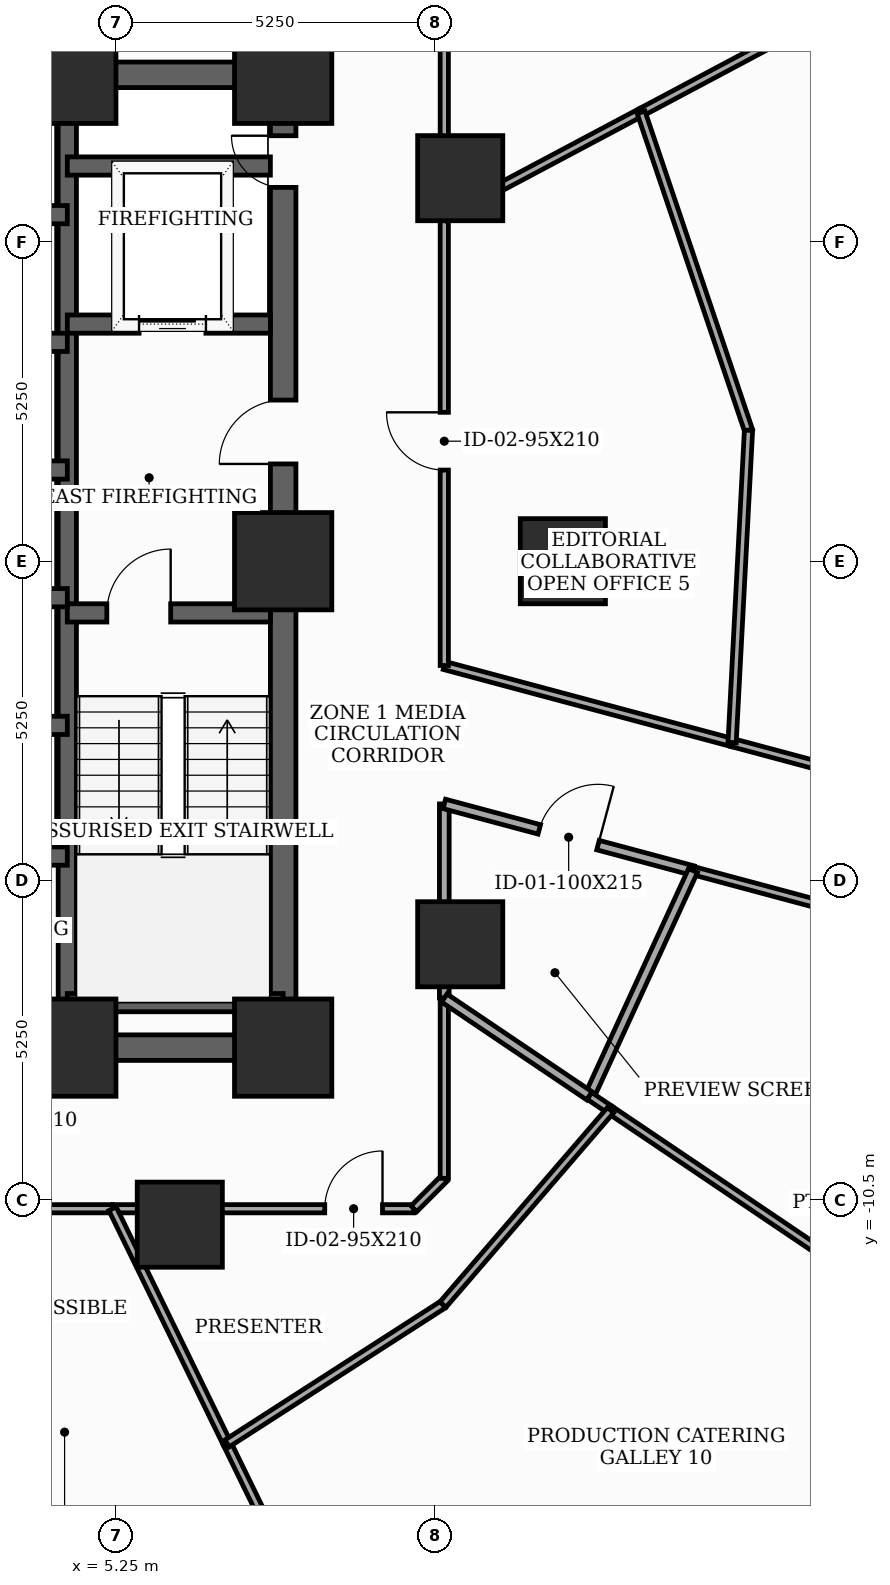
"""IFC4 building model, lengths in metres.
Left out: names, types, materials, properties, quantities, classifications, styles, units other than length and angle.
Written with IfcOpenShell. Run it as: python <this file> out.ifc"""

import sys

from ifc_helpers import new_model, si_unit, direction, frame, frame_2d, origin, origin_2d, place, context, subcontext, project, spatial, rectangle, extrude, element, fill, save


model = new_model("IFC4")
c1 = context("Model", 3, precision=1e-05, world=origin(), true_north=direction((0.0, 1.0)))
c2 = subcontext(c1, "Body", "Model", "MODEL_VIEW")
j1 = project(units=[si_unit("LENGTHUNIT", "METRE"), si_unit("PLANEANGLEUNIT", "RADIAN")], contexts=[c1])
p1 = place(None, origin())
s1 = spatial("IfcSite", under=j1, at=p1, CompositionType="ELEMENT")
p2 = place(p1, origin())
s2 = spatial("IfcBuilding", under=s1, at=p2, CompositionType="ELEMENT")
p3 = place(p2, frame((0.0, 0.0, 44.5)))
s3 = spatial("IfcBuildingStorey", under=s2, at=p3, CompositionType="ELEMENT", Elevation=44.5)
for number, where, z_axis, x_axis in (
    (1, (4.45, -8.0, 0.0), (0.0, 0.0, 1.0), (1.0, 0.0, 0.0)),
    (2, (8.0, -8.0, 0.0), (0.0, 0.0, 1.0), (1.0, 0.0, 0.0)),
    (3, (8.0, 0.0, 0.0), (0.0, 0.0, 1.0), (1.0, 0.0, 0.0)),
    (4, (8.0, 8.0, 0.0), (0.0, 0.0, 1.0), (1.0, 0.0, 0.0)),
    (5, (4.45, 8.0, 0.0), (0.0, 0.0, 1.0), (1.0, 0.0, 0.0)),
):
    element("IfcColumn", number, at=place(p3, frame(where, z_axis=z_axis, x_axis=x_axis)), inside=s3, PredefinedType="COLUMN", context=c2, shape_type="SweptSolid", body=[
        extrude(rectangle(XDim=1.6, YDim=1.6, at=origin_2d()), origin(), (0.0, 0.0, 1.0), 3.7),
    ])
for number, where, z_axis, x_axis in (
    (6, (12.6, 0.0, 0.0), (0.0, 0.0, 1.0), (1.0, 0.0, 0.0)),
    (7, (10.912, 6.3, 0.0), (0.0, 0.0, 1.0), (1.0, 0.0, 0.0)),
    (8, (6.3, -10.912, 0.0), (0.0, 0.0, 1.0), (1.0, 0.0, 0.0)),
    (9, (10.912, -6.3, 0.0), (0.0, 0.0, 1.0), (1.0, 0.0, 0.0)),
):
    element("IfcColumn", number, at=place(p3, frame(where, z_axis=z_axis, x_axis=x_axis)), inside=s3, PredefinedType="COLUMN", context=c2, shape_type="SweptSolid", body=[
        extrude(rectangle(XDim=1.4, YDim=1.4, at=origin_2d()), origin(), (0.0, 0.0, 1.0), 3.7),
    ])
p4 = place(p3, frame((8.0, -8.0, 0.0), z_axis=(0.0, 0.0, 1.0), x_axis=(0.0, 1.0, 0.0)))
e10 = element("IfcWall", 10, at=p4, inside=s3, PredefinedType="SHEAR", context=c2, shape_type="SweptSolid", body=[
    extrude(rectangle(XDim=16.0, YDim=0.42, at=frame_2d((8.0, 0.0))), origin(), (0.0, 0.0, 1.0), 3.5),
])
p5 = place(p4, frame((9.6, 0.0, 0.0)))
e11 = element("IfcOpeningElement", 11, at=p5, cuts=e10, PredefinedType="OPENING", context=c2, shape_type="SweptSolid", body=[
    extrude(rectangle(XDim=1.05, YDim=2.15, at=frame_2d((0.525, 1.075))), frame((0.0, 0.22, 0.0), z_axis=(0.0, -1.0, 0.0), x_axis=(1.0, 0.0, 0.0)), (0.0, 0.0, 1.0), 0.44),
])
p6 = place(p4, frame((14.148, 0.0, 0.0)))
e12 = element("IfcOpeningElement", 12, at=p6, cuts=e10, PredefinedType="OPENING", context=c2, shape_type="SweptSolid", body=[
    extrude(rectangle(XDim=0.85, YDim=2.02, at=frame_2d((0.425, 1.01))), frame((0.0, 0.22, 0.0), z_axis=(0.0, -1.0, 0.0), x_axis=(1.0, 0.0, 0.0)), (0.0, 0.0, 1.0), 0.44),
])
p7 = place(p3, frame((-8.0, -8.0, 0.0), z_axis=(0.0, 0.0, 1.0), x_axis=(1.0, 0.0, 0.0)))
e13 = element("IfcWall", 13, at=p7, inside=s3, PredefinedType="SHEAR", context=c2, shape_type="SweptSolid", body=[
    extrude(rectangle(XDim=16.0, YDim=0.42, at=frame_2d((8.0, 0.0))), origin(), (0.0, 0.0, 1.0), 3.5),
])
p8 = place(p7, frame((4.6, 0.0, 0.0)))
e14 = element("IfcOpeningElement", 14, at=p8, cuts=e13, PredefinedType="OPENING", context=c2, shape_type="SweptSolid", body=[
    extrude(rectangle(XDim=0.95, YDim=2.1, at=frame_2d((0.475, 1.05))), frame((0.0, 0.22, 0.0), z_axis=(0.0, -1.0, 0.0), x_axis=(1.0, 0.0, 0.0)), (0.0, 0.0, 1.0), 0.44),
])
p9 = place(p7, frame((7.52, 0.0, 0.0)))
e15 = element("IfcOpeningElement", 15, at=p9, cuts=e13, PredefinedType="OPENING", context=c2, shape_type="SweptSolid", body=[
    extrude(rectangle(XDim=0.95, YDim=2.1, at=frame_2d((0.475, 1.05))), frame((0.0, 0.22, 0.0), z_axis=(0.0, -1.0, 0.0), x_axis=(1.0, 0.0, 0.0)), (0.0, 0.0, 1.0), 0.44),
])
p10 = place(p7, frame((10.45, 0.0, 0.0)))
e16 = element("IfcOpeningElement", 16, at=p10, cuts=e13, PredefinedType="OPENING", context=c2, shape_type="SweptSolid", body=[
    extrude(rectangle(XDim=0.95, YDim=2.1, at=frame_2d((0.475, 1.05))), frame((0.0, 0.22, 0.0), z_axis=(0.0, -1.0, 0.0), x_axis=(1.0, 0.0, 0.0)), (0.0, 0.0, 1.0), 0.44),
])
p11 = place(p3, frame((-8.0, 8.0, 0.0), z_axis=(0.0, 0.0, 1.0), x_axis=(1.0, 0.0, 0.0)))
e17 = element("IfcWall", 17, at=p11, inside=s3, PredefinedType="SHEAR", context=c2, shape_type="SweptSolid", body=[
    extrude(rectangle(XDim=16.0, YDim=0.42, at=frame_2d((8.0, 0.0))), origin(), (0.0, 0.0, 1.0), 3.5),
])
p12 = place(p11, frame((7.1, 0.0, 0.0)))
e18 = element("IfcOpeningElement", 18, at=p12, cuts=e17, PredefinedType="OPENING", context=c2, shape_type="SweptSolid", body=[
    extrude(rectangle(XDim=1.8, YDim=2.15, at=frame_2d((0.9, 1.075))), frame((0.0, 0.22, 0.0), z_axis=(0.0, -1.0, 0.0), x_axis=(1.0, 0.0, 0.0)), (0.0, 0.0, 1.0), 0.44),
])
p13 = place(p3, frame((4.45, -7.79, 0.0), z_axis=(0.0, 0.0, 1.0), x_axis=(0.0, 1.0, 0.0)))
e19 = element("IfcWall", 19, at=p13, inside=s3, PredefinedType="SHEAR", context=c2, shape_type="SweptSolid", body=[
    extrude(rectangle(XDim=15.58, YDim=0.3, at=frame_2d((7.79, 0.0))), origin(), (0.0, 0.0, 1.0), 3.5),
])
p14 = place(p3, frame((4.45, -0.85, 0.0), z_axis=(0.0, 0.0, 1.0), x_axis=(1.0, 0.0, 0.0)))
e20 = element("IfcWall", 20, at=p14, inside=s3, PredefinedType="SHEAR", context=c2, shape_type="SweptSolid", body=[
    extrude(rectangle(XDim=3.34, YDim=0.3, at=frame_2d((1.67, 0.0))), origin(), (0.0, 0.0, 1.0), 3.5),
])
p15 = place(p14, frame((0.65, 0.0, 0.0)))
e21 = element("IfcOpeningElement", 21, at=p15, cuts=e20, PredefinedType="OPENING", context=c2, shape_type="SweptSolid", body=[
    extrude(rectangle(XDim=1.05, YDim=2.15, at=frame_2d((0.525, 1.075))), frame((0.0, 0.16, 0.0), z_axis=(0.0, -1.0, 0.0), x_axis=(1.0, 0.0, 0.0)), (0.0, 0.0, 1.0), 0.32),
])
p16 = place(p3, frame((4.45, -7.26, 0.0), z_axis=(0.0, 0.0, 1.0), x_axis=(1.0, 0.0, 0.0)))
e22 = element("IfcWall", 22, at=p16, inside=s3, PredefinedType="SHEAR", context=c2, shape_type="SweptSolid", body=[
    extrude(rectangle(XDim=3.55, YDim=0.3, at=frame_2d((1.775, 0.0))), origin(), (0.0, 0.0, 1.0), 3.5),
])
p17 = place(p3, frame((4.45, 3.9, 0.0), z_axis=(0.0, 0.0, 1.0), x_axis=(1.0, 0.0, 0.0)))
e23 = element("IfcWall", 23, at=p17, inside=s3, PredefinedType="SHEAR", context=c2, shape_type="SweptSolid", body=[
    extrude(rectangle(XDim=3.34, YDim=0.3, at=frame_2d((1.67, 0.0))), origin(), (0.0, 0.0, 1.0), 3.5),
])
p18 = place(p17, frame((1.18, 0.0, 0.0)))
e24 = element("IfcOpeningElement", 24, at=p18, cuts=e23, PredefinedType="OPENING", context=c2, shape_type="SweptSolid", body=[
    extrude(rectangle(XDim=1.1, YDim=2.1, at=frame_2d((0.55, 1.05))), frame((0.0, 0.16, 0.0), z_axis=(0.0, -1.0, 0.0), x_axis=(1.0, 0.0, 0.0)), (0.0, 0.0, 1.0), 0.32),
])
p19 = place(p3, frame((4.45, 6.5, 0.0), z_axis=(0.0, 0.0, 1.0), x_axis=(1.0, 0.0, 0.0)))
e25 = element("IfcWall", 25, at=p19, inside=s3, PredefinedType="SHEAR", context=c2, shape_type="SweptSolid", body=[
    extrude(rectangle(XDim=3.34, YDim=0.3, at=frame_2d((1.67, 0.0))), origin(), (0.0, 0.0, 1.0), 3.5),
])
p20 = place(p3, frame((-4.45, -4.85, 0.0), z_axis=(0.0, 0.0, 1.0), x_axis=(1.0, 0.0, 0.0)))
e26 = element("IfcWall", 26, at=p20, inside=s3, PredefinedType="SHEAR", context=c2, shape_type="SweptSolid", body=[
    extrude(rectangle(XDim=8.9, YDim=0.3, at=frame_2d((4.45, 0.0))), origin(), (0.0, 0.0, 1.0), 3.5),
])
for number, where, z_axis, x_axis in (
    (27, (1.68, 1.5, 0.0), (0.0, 0.0, 1.0), (1.0, 0.0, 0.0)),
    (28, (1.68, 3.6, 0.0), (0.0, 0.0, 1.0), (1.0, 0.0, 0.0)),
    (29, (1.68, 5.7, 0.0), (0.0, 0.0, 1.0), (1.0, 0.0, 0.0)),
    (30, (1.68, -2.7, 0.0), (0.0, 0.0, 1.0), (1.0, 0.0, 0.0)),
    (31, (1.68, -0.6, 0.0), (0.0, 0.0, 1.0), (1.0, 0.0, 0.0)),
):
    element("IfcWall", number, at=place(p3, frame(where, z_axis=z_axis, x_axis=x_axis)), inside=s3, PredefinedType="SHEAR", context=c2, shape_type="SweptSolid", body=[
        extrude(rectangle(XDim=2.77, YDim=0.3, at=frame_2d((1.385, 0.0))), origin(), (0.0, 0.0, 1.0), 3.5),
    ])
p21 = place(p3, frame((10.65, 5.663, 0.0), z_axis=(0.0, 0.0, 1.0), x_axis=(0.0, 1.0, 0.0)))
e32 = element("IfcWall", 32, at=p21, inside=s3, PredefinedType="PARTITIONING", context=c2, shape_type="SweptSolid", body=[
    extrude(rectangle(XDim=4.487, YDim=0.135, at=frame_2d((2.243, 0.0))), origin(), (0.0, 0.0, 1.0), 2.785),
])
p22 = place(p3, frame((10.65, -7.184, 0.0), z_axis=(0.0, 0.0, 1.0), x_axis=(0.0, 1.0, 0.0)))
e33 = element("IfcWall", 33, at=p22, inside=s3, PredefinedType="PARTITIONING", context=c2, shape_type="SweptSolid", body=[
    extrude(rectangle(XDim=3.192, YDim=0.16, at=frame_2d((1.596, 0.0))), origin(), (0.0, 0.0, 1.0), 2.785),
])
p23 = place(p3, frame((10.65, -3.992, 0.0), z_axis=(0.0, 0.0, 1.0), x_axis=(0.965925146235, -0.258821583086, 0.0)))
e34 = element("IfcWall", 34, at=p23, inside=s3, PredefinedType="PARTITIONING", context=c2, shape_type="SweptSolid", body=[
    extrude(rectangle(XDim=4.234, YDim=0.16, at=frame_2d((2.117, 0.0))), origin(), (0.0, 0.0, 1.0), 2.785),
])
p24 = place(p23, frame((1.617, 0.0, 0.0)))
e35 = element("IfcOpeningElement", 35, at=p24, cuts=e34, PredefinedType="OPENING", context=c2, shape_type="SweptSolid", body=[
    extrude(rectangle(XDim=1.0, YDim=2.15, at=frame_2d((0.5, 1.075))), frame((0.0, 0.09, 0.0), z_axis=(0.0, -1.0, 0.0), x_axis=(1.0, 0.0, 0.0)), (0.0, 0.0, 1.0), 0.18),
])
p25 = place(p3, frame((14.74, -5.088, 0.0), z_axis=(0.0, 0.0, 1.0), x_axis=(0.965895912523, -0.258930659002, 0.0)))
e36 = element("IfcWall", 36, at=p25, inside=s3, PredefinedType="PARTITIONING", context=c2, shape_type="SweptSolid", body=[
    extrude(rectangle(XDim=7.045, YDim=0.135, at=frame_2d((3.522, 0.0))), origin(), (0.0, 0.0, 1.0), 2.935),
])
p26 = place(p25, frame((3.048, 0.0, 0.0)))
e37 = element("IfcOpeningElement", 37, at=p26, cuts=e36, PredefinedType="OPENING", context=c2, shape_type="SweptSolid", body=[
    extrude(rectangle(XDim=0.95, YDim=2.1, at=frame_2d((0.475, 1.05))), frame((0.0, 0.077, 0.0), z_axis=(0.0, -1.0, 0.0), x_axis=(1.0, 0.0, 0.0)), (0.0, 0.0, 1.0), 0.155),
])
p27 = place(p3, frame((22.115, -4.787, 0.0), z_axis=(0.0, 0.0, 1.0), x_axis=(-0.965912084765, 0.258870323726, 0.0)))
e38 = element("IfcWall", 38, at=p27, inside=s3, PredefinedType="PARTITIONING", context=c2, shape_type="SweptSolid", body=[
    extrude(rectangle(XDim=6.969, YDim=0.135, at=frame_2d((3.485, 0.0))), origin(), (0.0, 0.0, 1.0), 3.085),
])
p28 = place(p3, frame((15.383, -2.983, 0.0), z_axis=(0.0, 0.0, 1.0), x_axis=(-0.965947384406, 0.258738575706, 0.0)))
e39 = element("IfcWall", 39, at=p28, inside=s3, PredefinedType="PARTITIONING", context=c2, shape_type="SweptSolid", body=[
    extrude(rectangle(XDim=4.9, YDim=0.135, at=frame_2d((2.45, 0.0))), origin(), (0.0, 0.0, 1.0), 2.785),
])
p29 = place(p3, frame((10.65, -1.715, 0.0), z_axis=(0.0, 0.0, 1.0), x_axis=(0.0, 1.0, 0.0)))
e40 = element("IfcWall", 40, at=p29, inside=s3, PredefinedType="PARTITIONING", context=c2, shape_type="SweptSolid", body=[
    extrude(rectangle(XDim=7.378, YDim=0.135, at=frame_2d((3.689, 0.0))), origin(), (0.0, 0.0, 1.0), 2.785),
])
p30 = place(p29, frame((3.214, 0.0, 0.0)))
e41 = element("IfcOpeningElement", 41, at=p30, cuts=e40, PredefinedType="OPENING", context=c2, shape_type="SweptSolid", body=[
    extrude(rectangle(XDim=0.95, YDim=2.1, at=frame_2d((0.475, 1.05))), frame((0.0, 0.077, 0.0), z_axis=(0.0, -1.0, 0.0), x_axis=(1.0, 0.0, 0.0)), (0.0, 0.0, 1.0), 0.155),
])
p31 = place(p3, frame((2.45, -10.65, 0.0), z_axis=(0.0, 0.0, 1.0), x_axis=(1.0, 0.0, 0.0)))
e42 = element("IfcWall", 42, at=p31, inside=s3, PredefinedType="PARTITIONING", context=c2, shape_type="SweptSolid", body=[
    extrude(rectangle(XDim=2.744, YDim=0.135, at=frame_2d((1.372, 0.0))), origin(), (0.0, 0.0, 1.0), 3.5),
])
p32 = place(p31, frame((0.568, 0.0, 0.0)))
e43 = element("IfcOpeningElement", 43, at=p32, cuts=e42, PredefinedType="OPENING", context=c2, shape_type="SweptSolid", body=[
    extrude(rectangle(XDim=0.95, YDim=2.1, at=frame_2d((0.475, 1.05))), frame((0.0, 0.077, 0.0), z_axis=(0.0, -1.0, 0.0), x_axis=(1.0, 0.0, 0.0)), (0.0, 0.0, 1.0), 0.155),
])
p33 = place(p3, frame((5.194, -10.65, 0.0), z_axis=(0.0, 0.0, 1.0), x_axis=(1.0, 0.0, 0.0)))
e44 = element("IfcWall", 44, at=p33, inside=s3, PredefinedType="PARTITIONING", context=c2, shape_type="SweptSolid", body=[
    extrude(rectangle(XDim=4.956, YDim=0.135, at=frame_2d((2.478, 0.0))), origin(), (0.0, 0.0, 1.0), 2.785),
])
p34 = place(p33, frame((3.49, 0.0, 0.0)))
e45 = element("IfcOpeningElement", 45, at=p34, cuts=e44, PredefinedType="OPENING", context=c2, shape_type="SweptSolid", body=[
    extrude(rectangle(XDim=0.95, YDim=2.1, at=frame_2d((0.475, 1.05))), frame((0.0, 0.077, 0.0), z_axis=(0.0, -1.0, 0.0), x_axis=(1.0, 0.0, 0.0)), (0.0, 0.0, 1.0), 0.155),
])
p35 = place(p3, frame((10.15, -10.65, 0.0), z_axis=(0.0, 0.0, 1.0), x_axis=(0.707106781187, 0.707106781187, 0.0)))
e46 = element("IfcWall", 46, at=p35, inside=s3, PredefinedType="PARTITIONING", context=c2, shape_type="SweptSolid", body=[
    extrude(rectangle(XDim=0.707, YDim=0.135, at=frame_2d((0.354, 0.0))), origin(), (0.0, 0.0, 1.0), 3.5),
])
p36 = place(p3, frame((10.65, -10.15, 0.0), z_axis=(0.0, 0.0, 1.0), x_axis=(0.0, 1.0, 0.0)))
e47 = element("IfcWall", 47, at=p36, inside=s3, PredefinedType="PARTITIONING", context=c2, shape_type="SweptSolid", body=[
    extrude(rectangle(XDim=2.966, YDim=0.135, at=frame_2d((1.483, 0.0))), origin(), (0.0, 0.0, 1.0), 3.5),
])
p37 = place(p3, frame((13.886, 7.383, 0.0), z_axis=(0.0, 0.0, 1.0), x_axis=(0.88293033741, 0.469504014126, 0.0)))
e48 = element("IfcWall", 48, at=p37, inside=s3, PredefinedType="PARTITIONING", context=c2, shape_type="SweptSolid", body=[
    extrude(rectangle(XDim=3.122, YDim=0.135, at=frame_2d((1.561, 0.0))), origin(), (0.0, 0.0, 1.0), 2.935),
])
p38 = place(p3, frame((10.65, 5.663, 0.0), z_axis=(0.0, 0.0, 1.0), x_axis=(0.88302513666, 0.469325695041, 0.0)))
e49 = element("IfcWall", 49, at=p38, inside=s3, PredefinedType="PARTITIONING", context=c2, shape_type="SweptSolid", body=[
    extrude(rectangle(XDim=3.665, YDim=0.135, at=frame_2d((1.833, 0.0))), origin(), (0.0, 0.0, 1.0), 2.785),
])
p39 = place(p3, frame((13.038, -8.794, 0.0), z_axis=(0.0, 0.0, 1.0), x_axis=(0.417322480709, 0.908758464662, 0.0)))
e50 = element("IfcWall", 50, at=p39, inside=s3, PredefinedType="PARTITIONING", context=c2, shape_type="SweptSolid", body=[
    extrude(rectangle(XDim=4.078, YDim=0.16, at=frame_2d((2.039, 0.0))), origin(), (0.0, 0.0, 1.0), 3.5),
])
p40 = place(p3, frame((10.65, -7.184, 0.0), z_axis=(0.0, 0.0, 1.0), x_axis=(0.829196392101, -0.558957371654, 0.0)))
e51 = element("IfcWall", 51, at=p40, inside=s3, PredefinedType="PARTITIONING", context=c2, shape_type="SweptSolid", body=[
    extrude(rectangle(XDim=2.88, YDim=0.16, at=frame_2d((1.44, 0.0))), origin(), (0.0, 0.0, 1.0), 3.5),
])
p41 = place(p3, frame((13.886, 7.383, 0.0), z_axis=(0.0, 0.0, 1.0), x_axis=(0.320099223205, -0.947384023141, 0.0)))
e52 = element("IfcWall", 52, at=p41, inside=s3, PredefinedType="PARTITIONING", context=c2, shape_type="SweptSolid", body=[
    extrude(rectangle(XDim=5.521, YDim=0.135, at=frame_2d((2.76, 0.0))), origin(), (0.0, 0.0, 1.0), 2.685),
])
p42 = place(p3, frame((15.653, 2.153, 0.0), z_axis=(0.0, 0.0, 1.0), x_axis=(-0.05250152841, -0.998620843721, 0.0)))
e53 = element("IfcWall", 53, at=p42, inside=s3, PredefinedType="PARTITIONING", context=c2, shape_type="SweptSolid", body=[
    extrude(rectangle(XDim=5.143, YDim=0.135, at=frame_2d((2.572, 0.0))), origin(), (0.0, 0.0, 1.0), 2.685),
])
p43 = place(p3, frame((13.038, -8.794, 0.0), z_axis=(0.0, 0.0, 1.0), x_axis=(0.828163729679, -0.560486250361, 0.0)))
e54 = element("IfcWall", 54, at=p43, inside=s3, PredefinedType="PARTITIONING", context=c2, shape_type="SweptSolid", body=[
    extrude(rectangle(XDim=0.418, YDim=0.135, at=frame_2d((0.209, 0.0))), origin(), (0.0, 0.0, 1.0), 3.5),
])
p44 = place(p3, frame((13.384, -9.028, 0.0), z_axis=(0.0, 0.0, 1.0), x_axis=(0.829042972493, -0.55918489765, 0.0)))
e55 = element("IfcWall", 55, at=p44, inside=s3, PredefinedType="PARTITIONING", context=c2, shape_type="SweptSolid", body=[
    extrude(rectangle(XDim=16.791, YDim=0.135, at=frame_2d((8.396, 0.0))), origin(), (0.0, 0.0, 1.0), 2.935),
])
p45 = place(p44, frame((7.936, 0.0, 0.0)))
e56 = element("IfcOpeningElement", 56, at=p45, cuts=e55, PredefinedType="OPENING", context=c2, shape_type="SweptSolid", body=[
    extrude(rectangle(XDim=0.92, YDim=2.1, at=frame_2d((0.46, 1.05))), frame((0.0, 0.077, 0.0), z_axis=(0.0, -1.0, 0.0), x_axis=(1.0, 0.0, 0.0)), (0.0, 0.0, 1.0), 0.155),
])
p46 = place(p3, frame((7.077, -14.51, 0.0), z_axis=(0.0, 0.0, 1.0), x_axis=(-0.438392272504, 0.898783742292, 0.0)))
e57 = element("IfcWall", 57, at=p46, inside=s3, PredefinedType="PARTITIONING", context=c2, shape_type="SweptSolid", body=[
    extrude(rectangle(XDim=4.295, YDim=0.135, at=frame_2d((2.147, 0.0))), origin(), (0.0, 0.0, 1.0), 2.685),
])
p47 = place(p3, frame((8.138, -16.687, 0.0), z_axis=(0.0, 0.0, 1.0), x_axis=(-0.438320348892, 0.898818820312, 0.0)))
e58 = element("IfcWall", 58, at=p47, inside=s3, PredefinedType="PARTITIONING", context=c2, shape_type="SweptSolid", body=[
    extrude(rectangle(XDim=2.422, YDim=0.135, at=frame_2d((1.211, 0.0))), origin(), (0.0, 0.0, 1.0), 3.085),
])
p48 = place(p3, frame((7.077, -14.51, 0.0), z_axis=(0.0, 0.0, 1.0), x_axis=(0.841056333741, 0.540947542258, 0.0)))
e59 = element("IfcWall", 59, at=p48, inside=s3, PredefinedType="PARTITIONING", context=c2, shape_type="SweptSolid", body=[
    extrude(rectangle(XDim=4.222, YDim=0.135, at=frame_2d((2.111, 0.0))), origin(), (0.0, 0.0, 1.0), 2.685),
])
p49 = place(p3, frame((10.628, -12.226, 0.0), z_axis=(0.0, 0.0, 1.0), x_axis=(0.652832083446, 0.757502654004, 0.0)))
e60 = element("IfcWall", 60, at=p49, inside=s3, PredefinedType="PARTITIONING", context=c2, shape_type="SweptSolid", body=[
    extrude(rectangle(XDim=4.222, YDim=0.135, at=frame_2d((2.111, 0.0))), origin(), (0.0, 0.0, 1.0), 3.5),
])
p50 = place(p5, origin())
e61 = element("IfcDoor", 61, at=p50, inside=s3, OperationType="SINGLE_SWING_LEFT", PredefinedType="DOOR", context=c2, shape_type="SweptSolid", body=[
    extrude(rectangle(XDim=1.05, YDim=2.15, at=frame_2d((0.525, 1.075))), frame((0.0, 0.025, 0.0), z_axis=(0.0, -1.0, 0.0), x_axis=(1.0, 0.0, 0.0)), (0.0, 0.0, 1.0), 0.05),
])
fill(e11, e61)
p51 = place(p6, origin())
e62 = element("IfcDoor", 62, at=p51, inside=s3, OperationType="SINGLE_SWING_RIGHT", PredefinedType="TRAPDOOR", context=c2, shape_type="SweptSolid", body=[
    extrude(rectangle(XDim=0.85, YDim=2.02, at=frame_2d((0.425, 1.01))), frame((0.0, 0.025, 0.0), z_axis=(0.0, -1.0, 0.0), x_axis=(1.0, 0.0, 0.0)), (0.0, 0.0, 1.0), 0.05),
])
fill(e12, e62)
p52 = place(p15, origin())
e63 = element("IfcDoor", 63, at=p52, inside=s3, OperationType="SINGLE_SWING_RIGHT", PredefinedType="DOOR", context=c2, shape_type="SweptSolid", body=[
    extrude(rectangle(XDim=1.05, YDim=2.15, at=frame_2d((0.525, 1.075))), frame((0.0, 0.025, 0.0), z_axis=(0.0, -1.0, 0.0), x_axis=(1.0, 0.0, 0.0)), (0.0, 0.0, 1.0), 0.05),
])
fill(e21, e63)
p53 = place(p18, origin())
e64 = element("IfcDoor", 64, at=p53, inside=s3, OperationType="SLIDING_TO_LEFT", PredefinedType="DOOR", context=c2, shape_type="SweptSolid", body=[
    extrude(rectangle(XDim=1.1, YDim=2.1, at=frame_2d((0.55, 1.05))), frame((0.0, 0.025, 0.0), z_axis=(0.0, -1.0, 0.0), x_axis=(1.0, 0.0, 0.0)), (0.0, 0.0, 1.0), 0.05),
])
fill(e24, e64)
p54 = place(p24, origin())
e65 = element("IfcDoor", 65, at=p54, inside=s3, OperationType="SINGLE_SWING_RIGHT", PredefinedType="DOOR", context=c2, shape_type="SweptSolid", body=[
    extrude(rectangle(XDim=1.0, YDim=2.15, at=frame_2d((0.5, 1.075))), frame((0.0, 0.025, 0.0), z_axis=(0.0, -1.0, 0.0), x_axis=(1.0, 0.0, 0.0)), (0.0, 0.0, 1.0), 0.05),
])
fill(e35, e65)
p55 = place(p30, origin())
e66 = element("IfcDoor", 66, at=p55, inside=s3, OperationType="SINGLE_SWING_RIGHT", PredefinedType="DOOR", context=c2, shape_type="SweptSolid", body=[
    extrude(rectangle(XDim=0.95, YDim=2.1, at=frame_2d((0.475, 1.05))), frame((0.0, 0.025, 0.0), z_axis=(0.0, -1.0, 0.0), x_axis=(1.0, 0.0, 0.0)), (0.0, 0.0, 1.0), 0.05),
])
fill(e41, e66)
p56 = place(p34, origin())
e67 = element("IfcDoor", 67, at=p56, inside=s3, OperationType="SINGLE_SWING_RIGHT", PredefinedType="DOOR", context=c2, shape_type="SweptSolid", body=[
    extrude(rectangle(XDim=0.95, YDim=2.1, at=frame_2d((0.475, 1.05))), frame((0.0, 0.025, 0.0), z_axis=(0.0, -1.0, 0.0), x_axis=(1.0, 0.0, 0.0)), (0.0, 0.0, 1.0), 0.05),
])
fill(e45, e67)
save(model, sys.argv[1])
